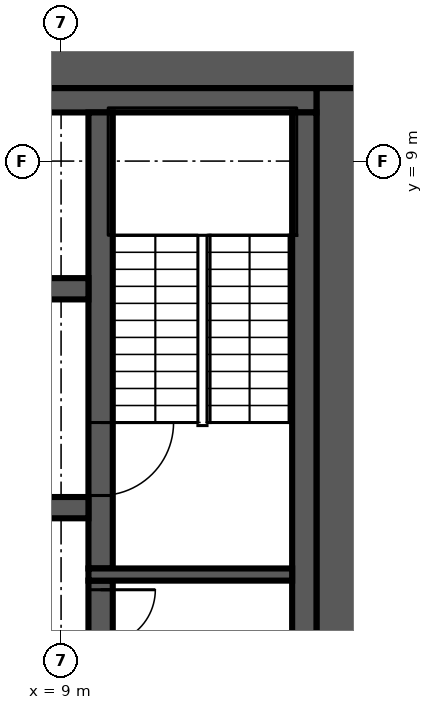
"""IFC4 building model, lengths in metres.
Left out: names, types, materials, properties, quantities, classifications, styles, units other than length and angle.
Written with IfcOpenShell. Run it as: python <this file> out.ifc"""

import sys

from ifc_helpers import new_model, si_unit, direction, frame, frame_2d, origin, place, context, subcontext, project, spatial, rectangle, extrude, element, fill, save


model = new_model("IFC4")
c1 = context("Model", 3, precision=1e-05, world=origin(), true_north=direction((0.0, 1.0)))
c2 = subcontext(c1, "Body", "Model", "MODEL_VIEW")
j1 = project(units=[si_unit("LENGTHUNIT", "METRE"), si_unit("PLANEANGLEUNIT", "RADIAN")], contexts=[c1])
p1 = place(None, origin())
s1 = spatial("IfcSite", under=j1, at=p1, CompositionType="ELEMENT")
p2 = place(p1, origin())
s2 = spatial("IfcBuilding", under=s1, at=p2, CompositionType="ELEMENT")
p3 = place(p2, frame((0.0, 0.0, 207.2)))
s3 = spatial("IfcBuildingStorey", under=s2, at=p3, CompositionType="ELEMENT", Elevation=207.2)
p4 = place(p3, frame((-14.0, 10.6, 0.0), z_axis=(0.0, 0.0, 1.0), x_axis=(1.0, 0.0, 0.0)))
e1 = element("IfcWall", 1, at=p4, inside=s3, PredefinedType="SHEAR", context=c2, shape_type="SweptSolid", body=[
    extrude(rectangle(XDim=28.0, YDim=0.8, at=frame_2d((14.0, 0.0))), origin(), (0.0, 0.0, 1.0), 3.82),
])
p5 = place(p4, frame((15.9, 0.0, 0.0)))
e2 = element("IfcOpeningElement", 2, at=p5, cuts=e1, PredefinedType="OPENING", context=c2, shape_type="SweptSolid", body=[
    extrude(rectangle(XDim=1.6, YDim=2.1, at=frame_2d((0.8, 1.05))), frame((0.0, 0.41, 0.0), z_axis=(0.0, -1.0, 0.0), x_axis=(1.0, 0.0, 0.0)), (0.0, 0.0, 1.0), 0.82),
])
p6 = place(p3, frame((13.6, 10.2, 0.0), z_axis=(0.0, 0.0, 1.0), x_axis=(0.0, -1.0, 0.0)))
e3 = element("IfcWall", 3, at=p6, inside=s3, PredefinedType="SHEAR", context=c2, shape_type="SweptSolid", body=[
    extrude(rectangle(XDim=20.4, YDim=0.8, at=frame_2d((10.2, 0.0))), origin(), (0.0, 0.0, 1.0), 3.82),
])
p7 = place(p3, frame((3.9, 10.0, 0.0), z_axis=(0.0, 0.0, 1.0), x_axis=(1.0, 0.0, 0.0)))
e4 = element("IfcWall", 4, at=p7, inside=s3, PredefinedType="SHEAR", context=c2, shape_type="SweptSolid", body=[
    extrude(rectangle(XDim=9.3, YDim=0.4, at=frame_2d((4.65, 0.0))), origin(), (0.0, 0.0, 1.0), 3.82),
])
p8 = place(p3, frame((13.0, 9.8, 0.0), z_axis=(0.0, 0.0, 1.0), x_axis=(0.0, -1.0, 0.0)))
e5 = element("IfcWall", 5, at=p8, inside=s3, PredefinedType="SHEAR", context=c2, shape_type="SweptSolid", body=[
    extrude(rectangle(XDim=19.6, YDim=0.4, at=frame_2d((9.8, 0.0))), origin(), (0.0, 0.0, 1.0), 3.82),
])
p9 = place(p3, frame((9.65, 2.1, 0.0), z_axis=(0.0, 0.0, 1.0), x_axis=(0.0, -1.0, 0.0)))
e6 = element("IfcWall", 6, at=p9, inside=s3, PredefinedType="SHEAR", context=c2, shape_type="SweptSolid", body=[
    extrude(rectangle(XDim=4.2, YDim=0.4, at=frame_2d((2.1, 0.0))), origin(), (0.0, 0.0, 1.0), 3.82),
])
p10 = place(p9, frame((0.15, 0.0, 0.0)))
e7 = element("IfcOpeningElement", 7, at=p10, cuts=e6, PredefinedType="OPENING", context=c2, shape_type="SweptSolid", body=[
    extrude(rectangle(XDim=0.9, YDim=2.1, at=frame_2d((0.45, 1.05))), frame((0.0, 0.21, 0.0), z_axis=(0.0, -1.0, 0.0), x_axis=(1.0, 0.0, 0.0)), (0.0, 0.0, 1.0), 0.42),
])
p11 = place(p3, frame((9.65, 9.8, 0.0), z_axis=(0.0, 0.0, 1.0), x_axis=(0.0, -1.0, 0.0)))
e8 = element("IfcWall", 8, at=p11, inside=s3, PredefinedType="SHEAR", context=c2, shape_type="SweptSolid", body=[
    extrude(rectangle(XDim=7.5, YDim=0.4, at=frame_2d((3.75, 0.0))), origin(), (0.0, 0.0, 1.0), 3.82),
])
p12 = place(p11, frame((5.1, 0.0, 0.0)))
e9 = element("IfcOpeningElement", 9, at=p12, cuts=e8, PredefinedType="OPENING", context=c2, shape_type="SweptSolid", body=[
    extrude(rectangle(XDim=1.2, YDim=2.1, at=frame_2d((0.6, 1.05))), frame((0.0, 0.21, 0.0), z_axis=(0.0, -1.0, 0.0), x_axis=(1.0, 0.0, 0.0)), (0.0, 0.0, 1.0), 0.42),
])
p13 = place(p3, frame((9.45, 2.2, 0.0), z_axis=(0.0, 0.0, 1.0), x_axis=(1.0, 0.0, 0.0)))
e10 = element("IfcWall", 10, at=p13, inside=s3, PredefinedType="SHEAR", context=c2, shape_type="SweptSolid", body=[
    extrude(rectangle(XDim=3.35, YDim=0.2, at=frame_2d((1.675, 0.0))), origin(), (0.0, 0.0, 1.0), 3.82),
])
p14 = place(p3, frame((-9.45, 6.9, 0.0), z_axis=(0.0, 0.0, 1.0), x_axis=(1.0, 0.0, 0.0)))
e11 = element("IfcWall", 11, at=p14, inside=s3, PredefinedType="SHEAR", context=c2, shape_type="SweptSolid", body=[
    extrude(rectangle(XDim=18.9, YDim=0.35, at=frame_2d((9.45, 0.0))), origin(), (0.0, 0.0, 1.0), 3.82),
])
p15 = place(p14, frame((11.55, 0.0, 0.0)))
e12 = element("IfcOpeningElement", 12, at=p15, cuts=e11, PredefinedType="OPENING", context=c2, shape_type="SweptSolid", body=[
    extrude(rectangle(XDim=1.2, YDim=2.1, at=frame_2d((0.6, 1.05))), frame((0.0, 0.185, 0.0), z_axis=(0.0, -1.0, 0.0), x_axis=(1.0, 0.0, 0.0)), (0.0, 0.0, 1.0), 0.37),
])
p16 = place(p14, frame((14.3, 0.0, 0.0)))
e13 = element("IfcOpeningElement", 13, at=p16, cuts=e11, PredefinedType="OPENING", context=c2, shape_type="SweptSolid", body=[
    extrude(rectangle(XDim=1.1, YDim=2.1, at=frame_2d((0.55, 1.05))), frame((0.0, 0.185, 0.0), z_axis=(0.0, -1.0, 0.0), x_axis=(1.0, 0.0, 0.0)), (0.0, 0.0, 1.0), 0.37),
])
p17 = place(p14, frame((17.0, 0.0, 0.0)))
e14 = element("IfcOpeningElement", 14, at=p17, cuts=e11, PredefinedType="OPENING", context=c2, shape_type="SweptSolid", body=[
    extrude(rectangle(XDim=1.1, YDim=2.1, at=frame_2d((0.55, 1.05))), frame((0.0, 0.185, 0.0), z_axis=(0.0, -1.0, 0.0), x_axis=(1.0, 0.0, 0.0)), (0.0, 0.0, 1.0), 0.37),
])
p18 = place(p14, frame((0.9, 0.0, 0.0)))
e15 = element("IfcOpeningElement", 15, at=p18, cuts=e11, PredefinedType="OPENING", context=c2, shape_type="SweptSolid", body=[
    extrude(rectangle(XDim=0.9, YDim=2.1, at=frame_2d((0.45, 1.05))), frame((0.0, 0.185, 0.0), z_axis=(0.0, -1.0, 0.0), x_axis=(1.0, 0.0, 0.0)), (0.0, 0.0, 1.0), 0.37),
])
p19 = place(p14, frame((4.95, 0.0, 0.0)))
e16 = element("IfcOpeningElement", 16, at=p19, cuts=e11, PredefinedType="OPENING", context=c2, shape_type="SweptSolid", body=[
    extrude(rectangle(XDim=0.9, YDim=2.1, at=frame_2d((0.45, 1.05))), frame((0.0, 0.185, 0.0), z_axis=(0.0, -1.0, 0.0), x_axis=(1.0, 0.0, 0.0)), (0.0, 0.0, 1.0), 0.37),
])
p20 = place(p14, frame((9.0, 0.0, 0.0)))
e17 = element("IfcOpeningElement", 17, at=p20, cuts=e11, PredefinedType="OPENING", context=c2, shape_type="SweptSolid", body=[
    extrude(rectangle(XDim=0.9, YDim=2.1, at=frame_2d((0.45, 1.05))), frame((0.0, 0.185, 0.0), z_axis=(0.0, -1.0, 0.0), x_axis=(1.0, 0.0, 0.0)), (0.0, 0.0, 1.0), 0.37),
])
p21 = place(p3, frame((9.45, 3.3, 0.0), z_axis=(0.0, 0.0, 1.0), x_axis=(-1.0, 0.0, 0.0)))
e18 = element("IfcWall", 18, at=p21, inside=s3, PredefinedType="SHEAR", context=c2, shape_type="SweptSolid", body=[
    extrude(rectangle(XDim=18.9, YDim=0.35, at=frame_2d((9.45, 0.0))), origin(), (0.0, 0.0, 1.0), 3.82),
])
p22 = place(p21, frame((6.2, 0.0, 0.0)))
e19 = element("IfcOpeningElement", 19, at=p22, cuts=e18, PredefinedType="OPENING", context=c2, shape_type="SweptSolid", body=[
    extrude(rectangle(XDim=1.1, YDim=2.1, at=frame_2d((0.55, 1.05))), frame((0.0, 0.185, 0.0), z_axis=(0.0, -1.0, 0.0), x_axis=(1.0, 0.0, 0.0)), (0.0, 0.0, 1.0), 0.37),
])
p23 = place(p21, frame((3.5, 0.0, 0.0)))
e20 = element("IfcOpeningElement", 20, at=p23, cuts=e18, PredefinedType="OPENING", context=c2, shape_type="SweptSolid", body=[
    extrude(rectangle(XDim=1.1, YDim=2.1, at=frame_2d((0.55, 1.05))), frame((0.0, 0.185, 0.0), z_axis=(0.0, -1.0, 0.0), x_axis=(1.0, 0.0, 0.0)), (0.0, 0.0, 1.0), 0.37),
])
p24 = place(p21, frame((0.9, 0.0, 0.0)))
e21 = element("IfcOpeningElement", 21, at=p24, cuts=e18, PredefinedType="OPENING", context=c2, shape_type="SweptSolid", body=[
    extrude(rectangle(XDim=0.9, YDim=2.1, at=frame_2d((0.45, 1.05))), frame((0.0, 0.185, 0.0), z_axis=(0.0, -1.0, 0.0), x_axis=(1.0, 0.0, 0.0)), (0.0, 0.0, 1.0), 0.37),
])
p25 = place(p21, frame((15.75, 0.0, 0.0)))
e22 = element("IfcOpeningElement", 22, at=p25, cuts=e18, PredefinedType="OPENING", context=c2, shape_type="SweptSolid", body=[
    extrude(rectangle(XDim=0.9, YDim=2.1, at=frame_2d((0.45, 1.05))), frame((0.0, 0.185, 0.0), z_axis=(0.0, -1.0, 0.0), x_axis=(1.0, 0.0, 0.0)), (0.0, 0.0, 1.0), 0.37),
])
p26 = place(p21, frame((10.35, 0.0, 0.0)))
e23 = element("IfcOpeningElement", 23, at=p26, cuts=e18, PredefinedType="OPENING", context=c2, shape_type="SweptSolid", body=[
    extrude(rectangle(XDim=0.9, YDim=2.1, at=frame_2d((0.45, 1.05))), frame((0.0, 0.185, 0.0), z_axis=(0.0, -1.0, 0.0), x_axis=(1.0, 0.0, 0.0)), (0.0, 0.0, 1.0), 0.37),
])
p27 = place(p10, origin())
e24 = element("IfcDoor", 24, at=p27, inside=s3, OperationType="SINGLE_SWING_RIGHT", PredefinedType="DOOR", context=c2, shape_type="SweptSolid", body=[
    extrude(rectangle(XDim=0.9, YDim=2.1, at=frame_2d((0.45, 1.05))), frame((0.0, 0.025, 0.0), z_axis=(0.0, -1.0, 0.0), x_axis=(1.0, 0.0, 0.0)), (0.0, 0.0, 1.0), 0.05),
])
fill(e7, e24)
p28 = place(p12, origin())
e25 = element("IfcDoor", 25, at=p28, inside=s3, OperationType="SINGLE_SWING_LEFT", PredefinedType="DOOR", context=c2, shape_type="SweptSolid", body=[
    extrude(rectangle(XDim=1.2, YDim=2.1, at=frame_2d((0.6, 1.05))), frame((0.0, 0.025, 0.0), z_axis=(0.0, -1.0, 0.0), x_axis=(1.0, 0.0, 0.0)), (0.0, 0.0, 1.0), 0.05),
])
fill(e9, e25)
save(model, sys.argv[1])
